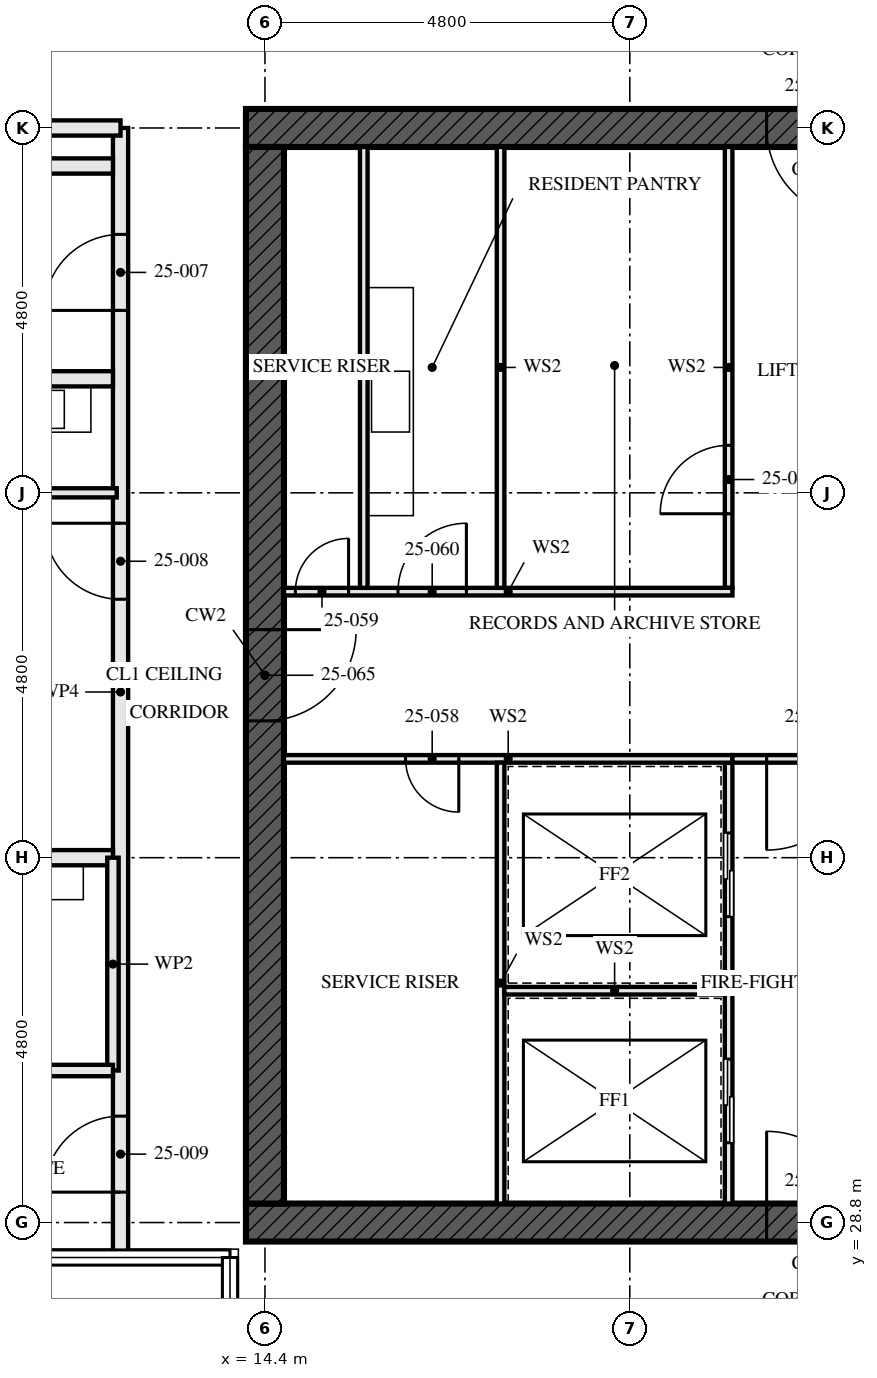
"""IFC4 building model, lengths in metres.
Left out: names, types, materials, properties, quantities, classifications, styles, units other than length and angle.
Written with IfcOpenShell. Run it as: python <this file> out.ifc"""

import sys

from ifc_helpers import new_model, si_unit, direction, frame, frame_2d, origin, place, context, subcontext, project, spatial, rectangle, extrude, element, fill, save


model = new_model("IFC4")
c1 = context("Model", 3, precision=1e-05, world=origin(), true_north=direction((0.0, 1.0)))
c2 = subcontext(c1, "Body", "Model", "MODEL_VIEW")
j1 = project(units=[si_unit("LENGTHUNIT", "METRE"), si_unit("PLANEANGLEUNIT", "RADIAN")], contexts=[c1])
p1 = place(None, origin())
s1 = spatial("IfcSite", under=j1, at=p1, CompositionType="ELEMENT")
p2 = place(p1, origin())
s2 = spatial("IfcBuilding", under=s1, at=p2, CompositionType="ELEMENT")
p3 = place(p2, frame((0.0, 0.0, 94.5)))
s3 = spatial("IfcBuildingStorey", under=s2, at=p3, CompositionType="ELEMENT", Elevation=94.5)
p4 = place(p3, frame((14.15, 28.8, -0.17), z_axis=(0.0, 0.0, 1.0), x_axis=(1.0, 0.0, 0.0)))
e1 = element("IfcWall", 1, at=p4, inside=s3, PredefinedType="SHEAR", context=c2, shape_type="SweptSolid", body=[
    extrude(rectangle(XDim=14.9, YDim=0.5, at=frame_2d((7.45, 0.0))), origin(), (0.0, 0.0, 1.0), 3.5),
])
p5 = place(p4, frame((6.85, 0.0, 0.17)))
e2 = element("IfcOpeningElement", 2, at=p5, cuts=e1, PredefinedType="OPENING", context=c2, shape_type="SweptSolid", body=[
    extrude(rectangle(XDim=1.2, YDim=2.1, at=frame_2d((0.6, 1.05))), frame((0.0, 0.26, 0.0), z_axis=(0.0, -1.0, 0.0), x_axis=(1.0, 0.0, 0.0)), (0.0, 0.0, 1.0), 0.521),
])
p6 = place(p3, frame((29.05, 43.2, -0.17), z_axis=(0.0, 0.0, 1.0), x_axis=(-1.0, 0.0, 0.0)))
e3 = element("IfcWall", 3, at=p6, inside=s3, PredefinedType="SHEAR", context=c2, shape_type="SweptSolid", body=[
    extrude(rectangle(XDim=14.9, YDim=0.5, at=frame_2d((7.45, 0.0))), origin(), (0.0, 0.0, 1.0), 3.5),
])
p7 = place(p6, frame((6.85, 0.0, 0.17)))
e4 = element("IfcOpeningElement", 4, at=p7, cuts=e3, PredefinedType="OPENING", context=c2, shape_type="SweptSolid", body=[
    extrude(rectangle(XDim=1.2, YDim=2.1, at=frame_2d((0.6, 1.05))), frame((0.0, 0.26, 0.0), z_axis=(0.0, -1.0, 0.0), x_axis=(1.0, 0.0, 0.0)), (0.0, 0.0, 1.0), 0.521),
])
p8 = place(p3, frame((14.4, 42.95, -0.17), z_axis=(0.0, 0.0, 1.0), x_axis=(0.0, -1.0, 0.0)))
e5 = element("IfcWall", 5, at=p8, inside=s3, PredefinedType="SHEAR", context=c2, shape_type="SweptSolid", body=[
    extrude(rectangle(XDim=13.9, YDim=0.5, at=frame_2d((6.95, 0.0))), origin(), (0.0, 0.0, 1.0), 3.5),
])
p9 = place(p8, frame((6.35, 0.0, 0.17)))
e6 = element("IfcOpeningElement", 6, at=p9, cuts=e5, PredefinedType="OPENING", context=c2, shape_type="SweptSolid", body=[
    extrude(rectangle(XDim=1.2, YDim=2.1, at=frame_2d((0.6, 1.05))), frame((0.0, 0.26, 0.0), z_axis=(0.0, -1.0, 0.0), x_axis=(1.0, 0.0, 0.0)), (0.0, 0.0, 1.0), 0.521),
])
for number, where, z_axis, x_axis in (
    (7, (7.7, 42.7, 0.0), (0.0, 0.0, 1.0), (1.0, 0.0, 0.0)),
    (8, (7.7, 39.9, 0.0), (0.0, 0.0, 1.0), (1.0, 0.0, 0.0)),
):
    element("IfcWall", number, at=place(p3, frame(where, z_axis=z_axis, x_axis=x_axis)), inside=s3, PredefinedType="SOLIDWALL", context=c2, shape_type="SweptSolid", body=[
        extrude(rectangle(XDim=4.7, YDim=0.2, at=frame_2d((2.35, 0.0))), origin(), (0.0, 0.0, 1.0), 2.99),
    ])
p10 = place(p3, frame((7.8, 38.4, 0.0), z_axis=(0.0, 0.0, 1.0), x_axis=(1.0, 0.0, 0.0)))
e9 = element("IfcWall", 9, at=p10, inside=s3, PredefinedType="PARTITIONING", context=c2, shape_type="SweptSolid", body=[
    extrude(rectangle(XDim=4.65, YDim=0.12, at=frame_2d((2.325, 0.0))), origin(), (0.0, 0.0, 1.0), 2.55),
])
p11 = place(p10, frame((1.875, 0.0, 0.0)))
e10 = element("IfcOpeningElement", 10, at=p11, cuts=e9, PredefinedType="OPENING", context=c2, shape_type="SweptSolid", body=[
    extrude(rectangle(XDim=0.9, YDim=2.1, at=frame_2d((0.45, 1.05))), frame((0.0, 0.071, 0.0), z_axis=(0.0, -1.0, 0.0), x_axis=(1.0, 0.0, 0.0)), (0.0, 0.0, 1.0), 0.141),
])
p12 = place(p3, frame((5.145, 33.6, 0.0), z_axis=(0.0, 0.0, 1.0), x_axis=(1.0, 0.0, 0.0)))
e11 = element("IfcWall", 11, at=p12, inside=s3, PredefinedType="PARTITIONING", context=c2, shape_type="SweptSolid", body=[
    extrude(rectangle(XDim=7.255, YDim=0.2, at=frame_2d((3.627, 0.0))), origin(), (0.0, 0.0, 1.0), 2.55),
])
p13 = place(p3, frame((9.4, 30.8, 0.0), z_axis=(0.0, 0.0, 1.0), x_axis=(1.0, 0.0, 0.0)))
e12 = element("IfcWall", 12, at=p13, inside=s3, PredefinedType="PARTITIONING", context=c2, shape_type="SweptSolid", body=[
    extrude(rectangle(XDim=3.0, YDim=0.15, at=frame_2d((1.5, 0.0))), origin(), (0.0, 0.0, 1.0), 3.33),
])
p14 = place(p3, frame((12.4, 33.6, 0.0), z_axis=(0.0, 0.0, 1.0), x_axis=(0.0, -1.0, 0.0)))
e13 = element("IfcWall", 13, at=p14, inside=s3, PredefinedType="PARTITIONING", context=c2, shape_type="SweptSolid", body=[
    extrude(rectangle(XDim=2.8, YDim=0.15, at=frame_2d((1.4, 0.0))), origin(), (0.0, 0.0, 1.0), 3.33),
])
p15 = place(p3, frame((12.5, 43.2, 0.0), z_axis=(0.0, 0.0, 1.0), x_axis=(0.0, -1.0, 0.0)))
e14 = element("IfcWall", 14, at=p15, inside=s3, PredefinedType="PARTITIONING", context=c2, shape_type="SweptSolid", body=[
    extrude(rectangle(XDim=14.84, YDim=0.2, at=frame_2d((7.42, 0.0))), origin(), (0.0, 0.0, 1.0), 2.32),
])
p16 = place(p15, frame((1.4, 0.0, 0.0)))
e15 = element("IfcOpeningElement", 15, at=p16, cuts=e14, PredefinedType="OPENING", context=c2, shape_type="SweptSolid", body=[
    extrude(rectangle(XDim=1.0, YDim=2.1, at=frame_2d((0.5, 1.05))), frame((0.0, 0.111, 0.0), z_axis=(0.0, -1.0, 0.0), x_axis=(1.0, 0.0, 0.0)), (0.0, 0.0, 1.0), 0.221),
])
p17 = place(p15, frame((5.2, 0.0, 0.0)))
e16 = element("IfcOpeningElement", 16, at=p17, cuts=e14, PredefinedType="OPENING", context=c2, shape_type="SweptSolid", body=[
    extrude(rectangle(XDim=1.0, YDim=2.1, at=frame_2d((0.5, 1.05))), frame((0.0, 0.111, 0.0), z_axis=(0.0, -1.0, 0.0), x_axis=(1.0, 0.0, 0.0)), (0.0, 0.0, 1.0), 0.221),
])
p18 = place(p15, frame((13.0, 0.0, 0.0)))
e17 = element("IfcOpeningElement", 17, at=p18, cuts=e14, PredefinedType="OPENING", context=c2, shape_type="SweptSolid", body=[
    extrude(rectangle(XDim=1.0, YDim=2.1, at=frame_2d((0.5, 1.05))), frame((0.0, 0.111, 0.0), z_axis=(0.0, -1.0, 0.0), x_axis=(1.0, 0.0, 0.0)), (0.0, 0.0, 1.0), 0.221),
])
p19 = place(p3, frame((15.7, 37.15, 0.0), z_axis=(0.0, 0.0, 1.0), x_axis=(0.0, 1.0, 0.0)))
e18 = element("IfcWall", 18, at=p19, inside=s3, PredefinedType="SOLIDWALL", context=c2, shape_type="SweptSolid", body=[
    extrude(rectangle(XDim=5.8, YDim=0.1, at=frame_2d((2.9, 0.0))), origin(), (0.0, 0.0, 1.0), 3.33),
])
p20 = place(p3, frame((20.5, 29.05, 0.0), z_axis=(0.0, 0.0, 1.0), x_axis=(0.0, 1.0, 0.0)))
e19 = element("IfcWall", 19, at=p20, inside=s3, PredefinedType="SOLIDWALL", context=c2, shape_type="SweptSolid", body=[
    extrude(rectangle(XDim=5.8, YDim=0.1, at=frame_2d((2.9, 0.0))), origin(), (0.0, 0.0, 1.0), 3.33),
])
p21 = place(p20, frame((0.8, 0.0, 0.0)))
e20 = element("IfcOpeningElement", 20, at=p21, cuts=e19, PredefinedType="OPENING", context=c2, shape_type="SweptSolid", body=[
    extrude(rectangle(XDim=1.1, YDim=2.3, at=frame_2d((0.55, 1.15))), frame((0.0, 0.061, 0.0), z_axis=(0.0, -1.0, 0.0), x_axis=(1.0, 0.0, 0.0)), (0.0, 0.0, 1.0), 0.121),
])
p22 = place(p20, frame((3.775, 0.0, 0.0)))
e21 = element("IfcOpeningElement", 21, at=p22, cuts=e19, PredefinedType="OPENING", context=c2, shape_type="SweptSolid", body=[
    extrude(rectangle(XDim=1.1, YDim=2.3, at=frame_2d((0.55, 1.15))), frame((0.0, 0.061, 0.0), z_axis=(0.0, -1.0, 0.0), x_axis=(1.0, 0.0, 0.0)), (0.0, 0.0, 1.0), 0.121),
])
p23 = place(p3, frame((20.5, 37.15, 0.0), z_axis=(0.0, 0.0, 1.0), x_axis=(0.0, 1.0, 0.0)))
e22 = element("IfcWall", 22, at=p23, inside=s3, PredefinedType="SOLIDWALL", context=c2, shape_type="SweptSolid", body=[
    extrude(rectangle(XDim=5.8, YDim=0.1, at=frame_2d((2.9, 0.0))), origin(), (0.0, 0.0, 1.0), 3.33),
])
p24 = place(p23, frame((0.975, 0.0, 0.0)))
e23 = element("IfcOpeningElement", 23, at=p24, cuts=e22, PredefinedType="OPENING", context=c2, shape_type="SweptSolid", body=[
    extrude(rectangle(XDim=0.9, YDim=2.1, at=frame_2d((0.45, 1.05))), frame((0.0, 0.061, 0.0), z_axis=(0.0, -1.0, 0.0), x_axis=(1.0, 0.0, 0.0)), (0.0, 0.0, 1.0), 0.121),
])
p25 = place(p3, frame((14.65, 34.9, 0.0), z_axis=(0.0, 0.0, 1.0), x_axis=(1.0, 0.0, 0.0)))
e24 = element("IfcWall", 24, at=p25, inside=s3, PredefinedType="SOLIDWALL", context=c2, shape_type="SweptSolid", body=[
    extrude(rectangle(XDim=5.9, YDim=0.1, at=frame_2d((2.95, 0.0))), origin(), (0.0, 0.0, 1.0), 3.33),
])
p26 = place(p25, frame((1.6, 0.0, 0.0)))
e25 = element("IfcOpeningElement", 25, at=p26, cuts=e24, PredefinedType="OPENING", context=c2, shape_type="SweptSolid", body=[
    extrude(rectangle(XDim=0.7, YDim=2.1, at=frame_2d((0.35, 1.05))), frame((0.0, 0.061, 0.0), z_axis=(0.0, -1.0, 0.0), x_axis=(1.0, 0.0, 0.0)), (0.0, 0.0, 1.0), 0.121),
])
p27 = place(p3, frame((14.65, 37.1, 0.0), z_axis=(0.0, 0.0, 1.0), x_axis=(1.0, 0.0, 0.0)))
e26 = element("IfcWall", 26, at=p27, inside=s3, PredefinedType="SOLIDWALL", context=c2, shape_type="SweptSolid", body=[
    extrude(rectangle(XDim=5.9, YDim=0.1, at=frame_2d((2.95, 0.0))), origin(), (0.0, 0.0, 1.0), 3.33),
])
p28 = place(p27, frame((0.15, 0.0, 0.0)))
e27 = element("IfcOpeningElement", 27, at=p28, cuts=e26, PredefinedType="OPENING", context=c2, shape_type="SweptSolid", body=[
    extrude(rectangle(XDim=0.7, YDim=2.1, at=frame_2d((0.35, 1.05))), frame((0.0, 0.061, 0.0), z_axis=(0.0, -1.0, 0.0), x_axis=(1.0, 0.0, 0.0)), (0.0, 0.0, 1.0), 0.121),
])
p29 = place(p27, frame((1.5, 0.0, 0.0)))
e28 = element("IfcOpeningElement", 28, at=p29, cuts=e26, PredefinedType="OPENING", context=c2, shape_type="SweptSolid", body=[
    extrude(rectangle(XDim=0.9, YDim=2.1, at=frame_2d((0.45, 1.05))), frame((0.0, 0.061, 0.0), z_axis=(0.0, -1.0, 0.0), x_axis=(1.0, 0.0, 0.0)), (0.0, 0.0, 1.0), 0.121),
])
p30 = place(p3, frame((20.55, 34.9, 0.0), z_axis=(0.0, 0.0, 1.0), x_axis=(1.0, 0.0, 0.0)))
e29 = element("IfcWall", 29, at=p30, inside=s3, PredefinedType="SOLIDWALL", context=c2, shape_type="SweptSolid", body=[
    extrude(rectangle(XDim=2.5, YDim=0.1, at=frame_2d((1.25, 0.0))), origin(), (0.0, 0.0, 1.0), 3.33),
])
p31 = place(p30, frame((0.45, 0.0, 0.0)))
e30 = element("IfcOpeningElement", 30, at=p31, cuts=e29, PredefinedType="OPENING", context=c2, shape_type="SweptSolid", body=[
    extrude(rectangle(XDim=1.2, YDim=2.1, at=frame_2d((0.6, 1.05))), frame((0.0, 0.061, 0.0), z_axis=(0.0, -1.0, 0.0), x_axis=(1.0, 0.0, 0.0)), (0.0, 0.0, 1.0), 0.121),
])
p32 = place(p3, frame((17.5, 29.05, 0.0), z_axis=(0.0, 0.0, 1.0), x_axis=(0.0, 1.0, 0.0)))
e31 = element("IfcWall", 31, at=p32, inside=s3, PredefinedType="SOLIDWALL", context=c2, shape_type="SweptSolid", body=[
    extrude(rectangle(XDim=5.8, YDim=0.1, at=frame_2d((2.9, 0.0))), origin(), (0.0, 0.0, 1.0), 3.33),
])
p33 = place(p3, frame((17.55, 31.85, 0.0), z_axis=(0.0, 0.0, 1.0), x_axis=(1.0, 0.0, 0.0)))
e32 = element("IfcWall", 32, at=p33, inside=s3, PredefinedType="SOLIDWALL", context=c2, shape_type="SweptSolid", body=[
    extrude(rectangle(XDim=2.9, YDim=0.1, at=frame_2d((1.45, 0.0))), origin(), (0.0, 0.0, 1.0), 3.33),
])
p34 = place(p3, frame((17.5, 37.15, 0.0), z_axis=(0.0, 0.0, 1.0), x_axis=(0.0, 1.0, 0.0)))
e33 = element("IfcWall", 33, at=p34, inside=s3, PredefinedType="SOLIDWALL", context=c2, shape_type="SweptSolid", body=[
    extrude(rectangle(XDim=5.8, YDim=0.1, at=frame_2d((2.9, 0.0))), origin(), (0.0, 0.0, 1.0), 3.33),
])
p35 = place(p3, frame((12.5, 43.2, 0.0), z_axis=(0.0, 0.0, 1.0), x_axis=(-1.0, 0.0, 0.0)))
e34 = element("IfcWall", 34, at=p35, inside=s3, PredefinedType="PARTITIONING", context=c2, shape_type="SweptSolid", body=[
    extrude(rectangle(XDim=2.555, YDim=0.2, at=frame_2d((1.277, 0.0))), origin(), (0.0, 0.0, 1.0), 2.32),
])
p36 = place(p16, frame((1.0, 0.0, 0.0), z_axis=(0.0, 0.0, 1.0), x_axis=(-1.0, 0.0, 0.0)))
e35 = element("IfcDoor", 35, at=p36, inside=s3, OperationType="SINGLE_SWING_RIGHT", PredefinedType="DOOR", context=c2, shape_type="SweptSolid", body=[
    extrude(rectangle(XDim=1.0, YDim=2.1, at=frame_2d((0.5, 1.05))), frame((0.0, 0.032, 0.0), z_axis=(0.0, -1.0, 0.0), x_axis=(1.0, 0.0, 0.0)), (0.0, 0.0, 1.0), 0.064),
])
fill(e15, e35)
p37 = place(p17, frame((1.0, 0.0, 0.0), z_axis=(0.0, 0.0, 1.0), x_axis=(-1.0, 0.0, 0.0)))
e36 = element("IfcDoor", 36, at=p37, inside=s3, OperationType="SINGLE_SWING_LEFT", PredefinedType="DOOR", context=c2, shape_type="SweptSolid", body=[
    extrude(rectangle(XDim=1.0, YDim=2.1, at=frame_2d((0.5, 1.05))), frame((0.0, 0.027, 0.0), z_axis=(0.0, -1.0, 0.0), x_axis=(1.0, 0.0, 0.0)), (0.0, 0.0, 1.0), 0.054),
])
fill(e16, e36)
p38 = place(p18, frame((1.0, 0.0, 0.0), z_axis=(0.0, 0.0, 1.0), x_axis=(-1.0, 0.0, 0.0)))
e37 = element("IfcDoor", 37, at=p38, inside=s3, OperationType="SINGLE_SWING_RIGHT", PredefinedType="DOOR", context=c2, shape_type="SweptSolid", body=[
    extrude(rectangle(XDim=1.0, YDim=2.1, at=frame_2d((0.5, 1.05))), frame((0.0, 0.027, 0.0), z_axis=(0.0, -1.0, 0.0), x_axis=(1.0, 0.0, 0.0)), (0.0, 0.0, 1.0), 0.054),
])
fill(e17, e37)
p39 = place(p21, origin())
e38 = element("IfcDoor", 38, at=p39, inside=s3, OperationType="SLIDING_TO_LEFT", PredefinedType="DOOR", context=c2, shape_type="SweptSolid", body=[
    extrude(rectangle(XDim=1.1, YDim=2.3, at=frame_2d((0.55, 1.15))), frame((0.0, 0.05, 0.0), z_axis=(0.0, -1.0, 0.0), x_axis=(1.0, 0.0, 0.0)), (0.0, 0.0, 1.0), 0.1),
])
fill(e20, e38)
p40 = place(p22, origin())
e39 = element("IfcDoor", 39, at=p40, inside=s3, OperationType="SLIDING_TO_LEFT", PredefinedType="DOOR", context=c2, shape_type="SweptSolid", body=[
    extrude(rectangle(XDim=1.1, YDim=2.3, at=frame_2d((0.55, 1.15))), frame((0.0, 0.05, 0.0), z_axis=(0.0, -1.0, 0.0), x_axis=(1.0, 0.0, 0.0)), (0.0, 0.0, 1.0), 0.1),
])
fill(e21, e39)
p41 = place(p24, origin())
e40 = element("IfcDoor", 40, at=p41, inside=s3, OperationType="SINGLE_SWING_RIGHT", PredefinedType="DOOR", context=c2, shape_type="SweptSolid", body=[
    extrude(rectangle(XDim=0.9, YDim=2.1, at=frame_2d((0.45, 1.05))), frame((0.0, 0.027, 0.0), z_axis=(0.0, -1.0, 0.0), x_axis=(1.0, 0.0, 0.0)), (0.0, 0.0, 1.0), 0.054),
])
fill(e23, e40)
p42 = place(p26, frame((0.7, 0.0, 0.0), z_axis=(0.0, 0.0, 1.0), x_axis=(-1.0, 0.0, 0.0)))
e41 = element("IfcDoor", 41, at=p42, inside=s3, OperationType="SINGLE_SWING_RIGHT", PredefinedType="DOOR", context=c2, shape_type="SweptSolid", body=[
    extrude(rectangle(XDim=0.7, YDim=2.1, at=frame_2d((0.35, 1.05))), frame((0.0, 0.027, 0.0), z_axis=(0.0, -1.0, 0.0), x_axis=(1.0, 0.0, 0.0)), (0.0, 0.0, 1.0), 0.054),
])
fill(e25, e41)
p43 = place(p28, origin())
e42 = element("IfcDoor", 42, at=p43, inside=s3, OperationType="SINGLE_SWING_LEFT", PredefinedType="DOOR", context=c2, shape_type="SweptSolid", body=[
    extrude(rectangle(XDim=0.7, YDim=2.1, at=frame_2d((0.35, 1.05))), frame((0.0, 0.027, 0.0), z_axis=(0.0, -1.0, 0.0), x_axis=(1.0, 0.0, 0.0)), (0.0, 0.0, 1.0), 0.054),
])
fill(e27, e42)
p44 = place(p29, origin())
e43 = element("IfcDoor", 43, at=p44, inside=s3, OperationType="SINGLE_SWING_LEFT", PredefinedType="DOOR", context=c2, shape_type="SweptSolid", body=[
    extrude(rectangle(XDim=0.9, YDim=2.1, at=frame_2d((0.45, 1.05))), frame((0.0, 0.027, 0.0), z_axis=(0.0, -1.0, 0.0), x_axis=(1.0, 0.0, 0.0)), (0.0, 0.0, 1.0), 0.054),
])
fill(e28, e43)
p45 = place(p31, frame((1.2, 0.0, 0.0), z_axis=(0.0, 0.0, 1.0), x_axis=(-1.0, 0.0, 0.0)))
e44 = element("IfcDoor", 44, at=p45, inside=s3, OperationType="SINGLE_SWING_LEFT", PredefinedType="DOOR", context=c2, shape_type="SweptSolid", body=[
    extrude(rectangle(XDim=1.2, YDim=2.1, at=frame_2d((0.6, 1.05))), frame((0.0, 0.027, 0.0), z_axis=(0.0, -1.0, 0.0), x_axis=(1.0, 0.0, 0.0)), (0.0, 0.0, 1.0), 0.054),
])
fill(e30, e44)
p46 = place(p5, origin())
e45 = element("IfcDoor", 45, at=p46, inside=s3, OperationType="SINGLE_SWING_LEFT", PredefinedType="DOOR", context=c2, shape_type="SweptSolid", body=[
    extrude(rectangle(XDim=1.2, YDim=2.1, at=frame_2d((0.6, 1.05))), frame((0.0, 0.027, 0.0), z_axis=(0.0, -1.0, 0.0), x_axis=(1.0, 0.0, 0.0)), (0.0, 0.0, 1.0), 0.054),
])
fill(e2, e45)
p47 = place(p9, origin())
e46 = element("IfcDoor", 46, at=p47, inside=s3, OperationType="SINGLE_SWING_LEFT", PredefinedType="DOOR", context=c2, shape_type="SweptSolid", body=[
    extrude(rectangle(XDim=1.2, YDim=2.1, at=frame_2d((0.6, 1.05))), frame((0.0, 0.027, 0.0), z_axis=(0.0, -1.0, 0.0), x_axis=(1.0, 0.0, 0.0)), (0.0, 0.0, 1.0), 0.054),
])
fill(e6, e46)
p48 = place(p7, origin())
e47 = element("IfcDoor", 47, at=p48, inside=s3, OperationType="SINGLE_SWING_LEFT", PredefinedType="DOOR", context=c2, shape_type="SweptSolid", body=[
    extrude(rectangle(XDim=1.2, YDim=2.1, at=frame_2d((0.6, 1.05))), frame((0.0, 0.027, 0.0), z_axis=(0.0, -1.0, 0.0), x_axis=(1.0, 0.0, 0.0)), (0.0, 0.0, 1.0), 0.054),
])
fill(e4, e47)
save(model, sys.argv[1])
